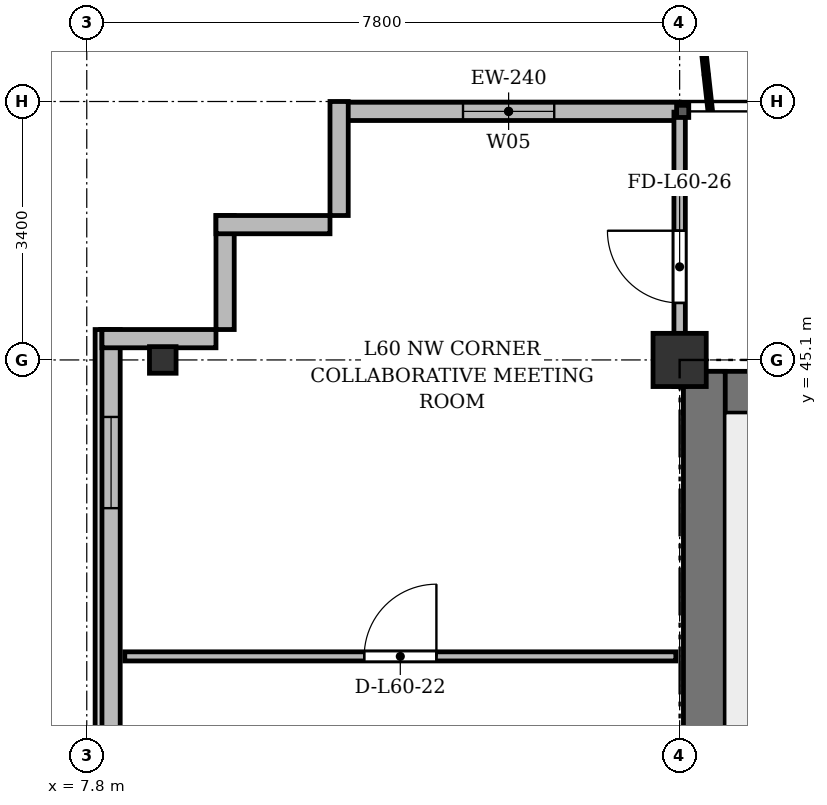
"""IFC4 building model, lengths in metres.
Left out: names, types, materials, properties, quantities, classifications, styles, units other than length and angle.
Written with IfcOpenShell. Run it as: python <this file> out.ifc"""

import sys

from ifc_helpers import new_model, si_unit, direction, frame, frame_2d, origin, origin_2d, place, context, subcontext, project, spatial, rectangle, i_section, extrude, source, transform, mapped, element, fill, save


model = new_model("IFC4")
c1 = context("Model", 3, precision=1e-05, world=origin(), true_north=direction((0.0, 1.0)))
c2 = subcontext(c1, "Body", "Model", "MODEL_VIEW")
j1 = project(units=[si_unit("LENGTHUNIT", "METRE"), si_unit("PLANEANGLEUNIT", "RADIAN")], contexts=[c1])
p1 = place(None, origin())
s1 = spatial("IfcSite", under=j1, at=p1, CompositionType="ELEMENT")
p2 = place(p1, origin())
s2 = spatial("IfcBuilding", under=s1, at=p2, CompositionType="ELEMENT")
p3 = place(p2, frame((0.0, 0.0, 230.1)))
s3 = spatial("IfcBuildingStorey", under=s2, at=p3, CompositionType="ELEMENT", Elevation=230.1)
m1 = source(origin(), c2, "Body", "SweptSolid", [
    extrude(i_section(OverallWidth=0.35, OverallDepth=0.35, WebThickness=0.018, FlangeThickness=0.028, at=origin_2d()), origin(), (0.0, 0.0, 1.0), 3.6),
])
p4 = place(p3, frame((8.8, 45.1, 0.0), z_axis=(0.0, 0.0, 1.0), x_axis=(1.0, 0.0, 0.0)))
e1 = element("IfcColumn", 1, at=p4, inside=s3, PredefinedType="COLUMN", context=c2, shape_type="MappedRepresentation", body=[
    mapped(m1, transform((0.0, 0.0, 0.0), x_axis=(1.0, 0.0, 0.0), y_axis=(0.0, 1.0, 0.0), z_axis=(0.0, 0.0, 1.0), scale=1.0)),
])
m2 = source(origin(), c2, "Body", "SweptSolid", [
    extrude(rectangle(XDim=0.7, YDim=0.7, at=origin_2d()), origin(), (0.0, 0.0, 1.0), 3.6),
])
p5 = place(p3, frame((15.6, 45.1, 0.0), z_axis=(0.0, 0.0, 1.0), x_axis=(1.0, 0.0, 0.0)))
e2 = element("IfcColumn", 2, at=p5, inside=s3, PredefinedType="COLUMN", context=c2, shape_type="MappedRepresentation", body=[
    mapped(m2, transform((0.0, 0.0, 0.0), x_axis=(1.0, 0.0, 0.0), y_axis=(0.0, 1.0, 0.0), z_axis=(0.0, 0.0, 1.0), scale=1.0)),
])
p6 = place(p3, frame((11.1, 48.37, 0.0), z_axis=(0.0, 0.0, 1.0), x_axis=(1.0, 0.0, 0.0)))
e3 = element("IfcWall", 3, at=p6, inside=s3, PredefinedType="SOLIDWALL", context=c2, shape_type="SweptSolid", body=[
    extrude(rectangle(XDim=4.5, YDim=0.24, at=frame_2d((2.25, 0.0))), origin(), (0.0, 0.0, 1.0), 3.36),
])
p7 = place(p6, frame((1.65, 0.0, 0.9)))
e4 = element("IfcOpeningElement", 4, at=p7, cuts=e3, PredefinedType="OPENING", context=c2, shape_type="SweptSolid", body=[
    extrude(rectangle(XDim=1.2, YDim=1.65, at=frame_2d((0.6, 0.825))), frame((0.0, 0.13, 0.0), z_axis=(0.0, -1.0, 0.0), x_axis=(1.0, 0.0, 0.0)), (0.0, 0.0, 1.0), 0.26),
])
p8 = place(p3, frame((8.12, 6.4, 0.0), z_axis=(0.0, 0.0, 1.0), x_axis=(0.0, 1.0, 0.0)))
e5 = element("IfcWall", 5, at=p8, inside=s3, PredefinedType="SOLIDWALL", context=c2, shape_type="SweptSolid", body=[
    extrude(rectangle(XDim=39.1, YDim=0.24, at=frame_2d((19.55, 0.0))), origin(), (0.0, 0.0, 1.0), 3.36),
])
p9 = place(p8, frame((1.45, 0.0, 0.92)))
e6 = element("IfcOpeningElement", 6, at=p9, cuts=e5, PredefinedType="OPENING", context=c2, shape_type="SweptSolid", body=[
    extrude(rectangle(XDim=1.2, YDim=1.65, at=frame_2d((0.6, 0.825))), frame((0.0, 0.13, 0.0), z_axis=(0.0, -1.0, 0.0), x_axis=(1.0, 0.0, 0.0)), (0.0, 0.0, 1.0), 0.26),
])
p10 = place(p8, frame((3.7, 0.0, 0.92)))
e7 = element("IfcOpeningElement", 7, at=p10, cuts=e5, PredefinedType="OPENING", context=c2, shape_type="SweptSolid", body=[
    extrude(rectangle(XDim=2.6, YDim=1.9, at=frame_2d((1.3, 0.95))), frame((0.0, 0.13, 0.0), z_axis=(0.0, -1.0, 0.0), x_axis=(1.0, 0.0, 0.0)), (0.0, 0.0, 1.0), 0.26),
])
p11 = place(p8, frame((7.9, 0.0, 0.92)))
e8 = element("IfcOpeningElement", 8, at=p11, cuts=e5, PredefinedType="OPENING", context=c2, shape_type="SweptSolid", body=[
    extrude(rectangle(XDim=2.6, YDim=1.9, at=frame_2d((1.3, 0.95))), frame((0.0, 0.13, 0.0), z_axis=(0.0, -1.0, 0.0), x_axis=(1.0, 0.0, 0.0)), (0.0, 0.0, 1.0), 0.26),
])
p12 = place(p8, frame((15.1, 0.0, 0.92)))
e9 = element("IfcOpeningElement", 9, at=p12, cuts=e5, PredefinedType="OPENING", context=c2, shape_type="SweptSolid", body=[
    extrude(rectangle(XDim=2.6, YDim=1.9, at=frame_2d((1.3, 0.95))), frame((0.0, 0.13, 0.0), z_axis=(0.0, -1.0, 0.0), x_axis=(1.0, 0.0, 0.0)), (0.0, 0.0, 1.0), 0.26),
])
p13 = place(p8, frame((29.1, 0.0, 0.92)))
e10 = element("IfcOpeningElement", 10, at=p13, cuts=e5, PredefinedType="OPENING", context=c2, shape_type="SweptSolid", body=[
    extrude(rectangle(XDim=2.6, YDim=1.9, at=frame_2d((1.3, 0.95))), frame((0.0, 0.13, 0.0), z_axis=(0.0, -1.0, 0.0), x_axis=(1.0, 0.0, 0.0)), (0.0, 0.0, 1.0), 0.26),
])
p14 = place(p8, frame((36.75, 0.0, 0.92)))
e11 = element("IfcOpeningElement", 11, at=p14, cuts=e5, PredefinedType="OPENING", context=c2, shape_type="SweptSolid", body=[
    extrude(rectangle(XDim=1.2, YDim=1.65, at=frame_2d((0.6, 0.825))), frame((0.0, 0.13, 0.0), z_axis=(0.0, -1.0, 0.0), x_axis=(1.0, 0.0, 0.0)), (0.0, 0.0, 1.0), 0.26),
])
for number, where, z_axis, x_axis in (
    (12, (8.0, 45.38, 0.0), (0.0, 0.0, 1.0), (1.0, 0.0, 0.0)),
    (13, (9.62, 45.5, 0.0), (0.0, 0.0, 1.0), (0.0, 1.0, 0.0)),
    (14, (9.5, 46.88, 0.0), (0.0, 0.0, 1.0), (1.0, 0.0, 0.0)),
    (15, (11.12, 47.0, 0.0), (0.0, 0.0, 1.0), (0.0, 1.0, 0.0)),
):
    element("IfcWall", number, at=place(p3, frame(where, z_axis=z_axis, x_axis=x_axis)), inside=s3, PredefinedType="SOLIDWALL", context=c2, shape_type="SweptSolid", body=[
        extrude(rectangle(XDim=1.5, YDim=0.24, at=frame_2d((0.75, 0.0))), origin(), (0.0, 0.0, 1.0), 3.36),
    ])
p15 = place(p3, frame((15.65, 44.675, 0.0), z_axis=(0.0, 0.0, 1.0), x_axis=(1.0, 0.0, 0.0)))
e16 = element("IfcWall", 16, at=p15, inside=s3, PredefinedType="SHEAR", context=c2, shape_type="SweptSolid", body=[
    extrude(rectangle(XDim=43.1, YDim=0.55, at=frame_2d((21.55, 0.0))), origin(), (0.0, 0.0, 1.0), 3.36),
])
p16 = place(p3, frame((15.925, 33.4, 0.0), z_axis=(0.0, 0.0, 1.0), x_axis=(0.0, 1.0, 0.0)))
e17 = element("IfcWall", 17, at=p16, inside=s3, PredefinedType="SHEAR", context=c2, shape_type="SweptSolid", body=[
    extrude(rectangle(XDim=11.55, YDim=0.55, at=frame_2d((5.775, 0.0))), origin(), (0.0, 0.0, 1.0), 3.36),
])
p17 = place(p3, frame((8.3, 41.2, 0.0), z_axis=(0.0, 0.0, 1.0), x_axis=(1.0, 0.0, 0.0)))
e18 = element("IfcWall", 18, at=p17, inside=s3, PredefinedType="PARTITIONING", context=c2, shape_type="SweptSolid", body=[
    extrude(rectangle(XDim=7.25, YDim=0.12, at=frame_2d((3.625, 0.0))), origin(), (0.0, 0.0, 1.0), 2.86),
])
p18 = place(p17, frame((3.15, 0.0, 0.0)))
e19 = element("IfcOpeningElement", 19, at=p18, cuts=e18, PredefinedType="OPENING", context=c2, shape_type="SweptSolid", body=[
    extrude(rectangle(XDim=0.95, YDim=2.15, at=frame_2d((0.475, 1.075))), frame((0.0, 0.07, 0.0), z_axis=(0.0, -1.0, 0.0), x_axis=(1.0, 0.0, 0.0)), (0.0, 0.0, 1.0), 0.14),
])
p19 = place(p3, frame((15.6, 44.75, 0.0), z_axis=(0.0, 0.0, 1.0), x_axis=(0.0, 1.0, 0.0)))
e20 = element("IfcWall", 20, at=p19, inside=s3, PredefinedType="PARTITIONING", context=c2, shape_type="SweptSolid", body=[
    extrude(rectangle(XDim=3.61, YDim=0.15, at=frame_2d((1.805, 0.0))), origin(), (0.0, 0.0, 1.0), 2.86),
])
p20 = place(p19, frame((1.1, 0.0, 0.0)))
e21 = element("IfcOpeningElement", 21, at=p20, cuts=e20, PredefinedType="OPENING", context=c2, shape_type="SweptSolid", body=[
    extrude(rectangle(XDim=0.95, YDim=2.15, at=frame_2d((0.475, 1.075))), frame((0.0, 0.085, 0.0), z_axis=(0.0, -1.0, 0.0), x_axis=(1.0, 0.0, 0.0)), (0.0, 0.0, 1.0), 0.17),
])
m3 = source(origin(), c2, "Body", "SweptSolid", [
    extrude(rectangle(XDim=1.2, YDim=1.65, at=frame_2d((0.6, 0.825))), frame((0.0, 0.03, 0.0), z_axis=(0.0, -1.0, 0.0), x_axis=(1.0, 0.0, 0.0)), (0.0, 0.0, 1.0), 0.06),
])
p21 = place(p7, origin())
e22 = element("IfcWindow", 22, at=p21, inside=s3, PartitioningType="SINGLE_PANEL", PredefinedType="WINDOW", context=c2, shape_type="MappedRepresentation", body=[
    mapped(m3, transform((0.0, 0.0, 0.0), x_axis=(1.0, 0.0, 0.0), y_axis=(0.0, 1.0, 0.0), z_axis=(0.0, 0.0, 1.0), scale=1.0)),
])
fill(e4, e22)
p22 = place(p14, origin())
e23 = element("IfcWindow", 23, at=p22, inside=s3, PartitioningType="SINGLE_PANEL", PredefinedType="WINDOW", context=c2, shape_type="MappedRepresentation", body=[
    mapped(m3, transform((0.0, 0.0, 0.0), x_axis=(1.0, 0.0, 0.0), y_axis=(0.0, 1.0, 0.0), z_axis=(0.0, 0.0, 1.0), scale=1.0)),
])
fill(e11, e23)
m4 = source(origin(), c2, "Body", "SweptSolid", [
    extrude(rectangle(XDim=0.95, YDim=2.15, at=frame_2d((0.475, 1.075))), frame((0.0, 0.025, 0.0), z_axis=(0.0, -1.0, 0.0), x_axis=(1.0, 0.0, 0.0)), (0.0, 0.0, 1.0), 0.05),
])
p23 = place(p18, origin())
e24 = element("IfcDoor", 24, at=p23, inside=s3, OperationType="SINGLE_SWING_RIGHT", PredefinedType="DOOR", context=c2, shape_type="MappedRepresentation", body=[
    mapped(m4, transform((0.0, 0.0, 0.0), x_axis=(1.0, 0.0, 0.0), y_axis=(0.0, 1.0, 0.0), z_axis=(0.0, 0.0, 1.0), scale=1.0)),
])
fill(e19, e24)
p24 = place(p20, origin())
e25 = element("IfcDoor", 25, at=p24, inside=s3, OperationType="SINGLE_SWING_RIGHT", PredefinedType="DOOR", context=c2, shape_type="MappedRepresentation", body=[
    mapped(m4, transform((0.0, 0.0, 0.0), x_axis=(1.0, 0.0, 0.0), y_axis=(0.0, 1.0, 0.0), z_axis=(0.0, 0.0, 1.0), scale=1.0)),
])
fill(e21, e25)
save(model, sys.argv[1])
